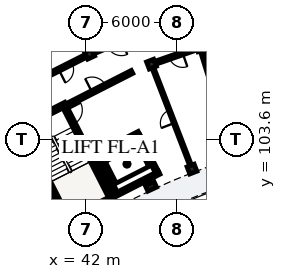
"""IFC4 building model, lengths in metres.
Left out: names, types, materials, properties, quantities, classifications, styles, units other than length and angle.
Written with IfcOpenShell. Run it as: python <this file> out.ifc"""

import sys

from ifc_helpers import new_model, si_unit, direction, frame, frame_2d, origin, origin_2d, place, context, subcontext, project, spatial, rectangle, extrude, element, fill, save


model = new_model("IFC4")
c1 = context("Model", 3, precision=1e-05, world=origin(), true_north=direction((0.0, 1.0)))
c2 = subcontext(c1, "Body", "Model", "MODEL_VIEW")
j1 = project(units=[si_unit("LENGTHUNIT", "METRE"), si_unit("PLANEANGLEUNIT", "RADIAN")], contexts=[c1])
p1 = place(None, origin())
s1 = spatial("IfcSite", under=j1, at=p1, CompositionType="ELEMENT")
p2 = place(p1, origin())
s2 = spatial("IfcBuilding", under=s1, at=p2, CompositionType="ELEMENT")
p3 = place(p2, frame((0.0, 0.0, 29.0)))
s3 = spatial("IfcBuildingStorey", under=s2, at=p3, CompositionType="ELEMENT", Elevation=29.0)
p4 = place(p3, frame((37.773, 104.296, 0.0), z_axis=(0.0, 0.0, 1.0), x_axis=(0.453992276384, -0.891005618941, 0.0)))
e1 = element("IfcWall", 1, at=p4, inside=s3, PredefinedType="SHEAR", context=c2, shape_type="SweptSolid", body=[
    extrude(rectangle(XDim=6.6, YDim=0.28, at=frame_2d((3.3, 0.0))), origin(), (0.0, 0.0, 1.0), 3.11),
])
for number, where, z_axis, x_axis in (
    (2, (40.709, 98.227, 0.0), (0.0, 0.0, 1.0), (0.891, 0.454, 0.0)),
    (3, (37.585, 104.357, 0.0), (0.0, 0.0, 1.0), (0.891, 0.454, 0.0)),
):
    element("IfcWall", number, at=place(p3, frame(where, z_axis=z_axis, x_axis=x_axis)), inside=s3, PredefinedType="SHEAR", context=c2, shape_type="SweptSolid", body=[
        extrude(rectangle(XDim=3.48, YDim=0.28, at=frame_2d((1.74, 0.0))), origin(), (0.0, 0.0, 1.0), 3.11),
    ])
p5 = place(p3, frame((40.625, 105.748, 0.0), z_axis=(0.0, 0.0, 1.0), x_axis=(0.453992276384, -0.891005618941, 0.0)))
e4 = element("IfcWall", 4, at=p5, inside=s3, PredefinedType="SHEAR", context=c2, shape_type="SweptSolid", body=[
    extrude(rectangle(XDim=6.6, YDim=0.28, at=frame_2d((3.3, 0.0))), origin(), (0.0, 0.0, 1.0), 3.11),
])
p6 = place(p5, frame((0.22, 0.0, 0.0)))
e5 = element("IfcOpeningElement", 5, at=p6, cuts=e4, PredefinedType="OPENING", context=c2, shape_type="SweptSolid", body=[
    extrude(rectangle(XDim=1.05, YDim=2.15, at=frame_2d((0.525, 1.075))), frame((0.0, 0.15, 0.0), z_axis=(0.0, -1.0, 0.0), x_axis=(1.0, 0.0, 0.0)), (0.0, 0.0, 1.0), 0.3),
])
p7 = place(p3, frame((42.597, 102.561, 0.0), z_axis=(0.0, 0.0, 1.0), x_axis=(0.891001200497, 0.454000947921, 0.0)))
e6 = element("IfcWall", 6, at=p7, inside=s3, PredefinedType="SHEAR", context=c2, shape_type="SweptSolid", body=[
    extrude(rectangle(XDim=3.26, YDim=0.23, at=frame_2d((1.63, 0.0))), origin(), (0.0, 0.0, 1.0), 3.11),
])
p8 = place(p7, frame((0.9, 0.0, 0.0)))
e7 = element("IfcOpeningElement", 7, at=p8, cuts=e6, PredefinedType="OPENING", context=c2, shape_type="SweptSolid", body=[
    extrude(rectangle(XDim=1.1, YDim=2.15, at=frame_2d((0.55, 1.075))), frame((0.0, 0.125, 0.0), z_axis=(0.0, -1.0, 0.0), x_axis=(1.0, 0.0, 0.0)), (0.0, 0.0, 1.0), 0.25),
])
p9 = place(p3, frame((43.927, 99.95, 0.0), z_axis=(0.0, 0.0, 1.0), x_axis=(0.891016635648, 0.453970654337, 0.0)))
e8 = element("IfcWall", 8, at=p9, inside=s3, PredefinedType="SHEAR", context=c2, shape_type="SweptSolid", body=[
    extrude(rectangle(XDim=3.26, YDim=0.23, at=frame_2d((1.63, 0.0))), origin(), (0.0, 0.0, 1.0), 3.11),
])
for number, where, z_axis, x_axis in (
    (9, (42.751, 102.511, 0.0), (0.0, 0.0, 1.0), (0.454, -0.891, 0.0)),
    (10, (45.451, 103.886, 0.0), (0.0, 0.0, 1.0), (0.454, -0.891, 0.0)),
):
    element("IfcWall", number, at=place(p3, frame(where, z_axis=z_axis, x_axis=x_axis)), inside=s3, PredefinedType="SHEAR", context=c2, shape_type="SweptSolid", body=[
        extrude(rectangle(XDim=2.7, YDim=0.23, at=frame_2d((1.35, 0.0))), origin(), (0.0, 0.0, 1.0), 3.11),
    ])
for number, where, z_axis, x_axis in (
    (11, (49.552, 109.695, 0.0), (0.0, 0.0, 1.0), (-0.298, 0.955, 0.0)),
    (12, (48.99, 101.667, 0.0), (0.0, 0.0, 1.0), (-0.36, 0.933, 0.0)),
    (13, (46.325, 108.57, 0.0), (0.0, 0.0, 1.0), (-0.36, 0.933, 0.0)),
):
    element("IfcColumn", number, at=place(p3, frame(where, z_axis=z_axis, x_axis=x_axis)), inside=s3, PredefinedType="COLUMN", context=c2, shape_type="SweptSolid", body=[
        extrude(rectangle(XDim=0.5, YDim=0.5, at=origin_2d()), origin(), (0.0, 0.0, 1.0), 3.115),
    ])
p10 = place(p3, frame((46.293, 100.522, 0.0), z_axis=(0.0, 0.0, 1.0), x_axis=(-0.420859924104, 0.907125638643, 0.0)))
e14 = element("IfcColumn", 14, at=p10, inside=s3, PredefinedType="PILASTER", context=c2, shape_type="SweptSolid", body=[
    extrude(rectangle(XDim=0.39, YDim=0.63, at=origin_2d()), origin(), (0.0, 0.0, 1.0), 3.115),
])
p11 = place(p3, frame((42.252, 109.23, 0.0), z_axis=(0.0, 0.0, 1.0), x_axis=(-0.420859924104, 0.907125638643, 0.0)))
e15 = element("IfcColumn", 15, at=p11, inside=s3, PredefinedType="COLUMN", context=c2, shape_type="SweptSolid", body=[
    extrude(rectangle(XDim=0.5, YDim=0.5, at=origin_2d()), origin(), (0.0, 0.0, 1.0), 3.115),
])
p12 = place(p3, frame((40.682, 105.834, 0.0), z_axis=(0.0, 0.0, 1.0), x_axis=(0.891003372311, 0.453996685595, 0.0)))
e16 = element("IfcWall", 16, at=p12, inside=s3, PredefinedType="PARTITIONING", context=c2, shape_type="SweptSolid", body=[
    extrude(rectangle(XDim=4.9, YDim=0.22, at=frame_2d((2.45, 0.0))), origin(), (0.0, 0.0, 1.0), 2.34),
])
p13 = place(p12, frame((1.95, 0.0, 0.0)))
e17 = element("IfcOpeningElement", 17, at=p13, cuts=e16, PredefinedType="OPENING", context=c2, shape_type="SweptSolid", body=[
    extrude(rectangle(XDim=1.0, YDim=2.15, at=frame_2d((0.5, 1.075))), frame((0.0, 0.12, 0.0), z_axis=(0.0, -1.0, 0.0), x_axis=(1.0, 0.0, 0.0)), (0.0, 0.0, 1.0), 0.24),
])
p14 = place(p3, frame((51.638, 103.013, 0.0), z_axis=(0.0, 0.0, 1.0), x_axis=(-0.2979590431, 0.954578655028, 0.0)))
e18 = element("IfcWall", 18, at=p14, inside=s3, PredefinedType="PARTITIONING", context=c2, shape_type="SweptSolid", body=[
    extrude(rectangle(XDim=6.6, YDim=0.185, at=frame_2d((3.3, 0.0))), origin(), (0.0, 0.0, 1.0), 2.37),
])
p15 = place(p3, frame((49.222, 109.58, 0.0), z_axis=(0.0, 0.0, 1.0), x_axis=(-0.944265123647, -0.329185929627, 0.0)))
e19 = element("IfcWall", 19, at=p15, inside=s3, PredefinedType="PARTITIONING", context=c2, shape_type="SweptSolid", body=[
    extrude(rectangle(XDim=2.718, YDim=0.205, at=frame_2d((1.359, 0.0))), origin(), (0.0, 0.0, 1.0), 2.37),
])
p16 = place(p15, frame((0.894, 0.0, 0.0)))
e20 = element("IfcOpeningElement", 20, at=p16, cuts=e19, PredefinedType="OPENING", context=c2, shape_type="SweptSolid", body=[
    extrude(rectangle(XDim=0.93, YDim=2.12, at=frame_2d((0.465, 1.06))), frame((0.0, 0.113, 0.0), z_axis=(0.0, -1.0, 0.0), x_axis=(1.0, 0.0, 0.0)), (0.0, 0.0, 1.0), 0.225),
])
p17 = place(p3, frame((48.846, 102.04, 0.0), z_axis=(0.0, 0.0, 1.0), x_axis=(-0.360183473608, 0.932881485152, 0.0)))
e21 = element("IfcWall", 21, at=p17, inside=s3, PredefinedType="PARTITIONING", context=c2, shape_type="SweptSolid", body=[
    extrude(rectangle(XDim=6.6, YDim=0.125, at=frame_2d((3.3, 0.0))), origin(), (0.0, 0.0, 1.0), 2.37),
])
p18 = place(p17, frame((2.845, 0.0, 0.0)))
e22 = element("IfcOpeningElement", 22, at=p18, cuts=e21, PredefinedType="OPENING", context=c2, shape_type="SweptSolid", body=[
    extrude(rectangle(XDim=0.91, YDim=2.1, at=frame_2d((0.455, 1.05))), frame((0.0, 0.073, 0.0), z_axis=(0.0, -1.0, 0.0), x_axis=(1.0, 0.0, 0.0)), (0.0, 0.0, 1.0), 0.145),
])
p19 = place(p3, frame((45.21, 110.486, 0.0), z_axis=(0.0, 0.0, 1.0), x_axis=(-0.920511160294, -0.390716270168, 0.0)))
e23 = element("IfcWall", 23, at=p19, inside=s3, PredefinedType="PARTITIONING", context=c2, shape_type="SweptSolid", body=[
    extrude(rectangle(XDim=2.863, YDim=0.205, at=frame_2d((1.432, 0.0))), origin(), (0.0, 0.0, 1.0), 2.37),
])
p20 = place(p19, frame((0.937, 0.0, 0.0)))
e24 = element("IfcOpeningElement", 24, at=p20, cuts=e23, PredefinedType="OPENING", context=c2, shape_type="SweptSolid", body=[
    extrude(rectangle(XDim=0.99, YDim=2.16, at=frame_2d((0.495, 1.08))), frame((0.0, 0.113, 0.0), z_axis=(0.0, -1.0, 0.0), x_axis=(1.0, 0.0, 0.0)), (0.0, 0.0, 1.0), 0.225),
])
p21 = place(p3, frame((41.94, 109.073, 0.0), z_axis=(0.0, 0.0, 1.0), x_axis=(-0.89273239336, -0.450587254419, 0.0)))
e25 = element("IfcWall", 25, at=p21, inside=s3, PredefinedType="PARTITIONING", context=c2, shape_type="SweptSolid", body=[
    extrude(rectangle(XDim=2.863, YDim=0.205, at=frame_2d((1.432, 0.0))), origin(), (0.0, 0.0, 1.0), 2.37),
])
p22 = place(p21, frame((0.947, 0.0, 0.0)))
e26 = element("IfcOpeningElement", 26, at=p22, cuts=e25, PredefinedType="OPENING", context=c2, shape_type="SweptSolid", body=[
    extrude(rectangle(XDim=0.97, YDim=2.15, at=frame_2d((0.485, 1.075))), frame((0.0, 0.113, 0.0), z_axis=(0.0, -1.0, 0.0), x_axis=(1.0, 0.0, 0.0)), (0.0, 0.0, 1.0), 0.225),
])
p23 = place(p6, origin())
e27 = element("IfcDoor", 27, at=p23, inside=s3, OperationType="SINGLE_SWING_LEFT", PredefinedType="DOOR", context=c2, shape_type="SweptSolid", body=[
    extrude(rectangle(XDim=1.05, YDim=2.15, at=frame_2d((0.525, 1.075))), frame((0.0, 0.025, 0.0), z_axis=(0.0, -1.0, 0.0), x_axis=(1.0, 0.0, 0.0)), (0.0, 0.0, 1.0), 0.05),
])
fill(e5, e27)
p24 = place(p8, origin())
e28 = element("IfcDoor", 28, at=p24, inside=s3, OperationType="DOUBLE_DOOR_SLIDING", PredefinedType="DOOR", context=c2, shape_type="SweptSolid", body=[
    extrude(rectangle(XDim=1.1, YDim=2.15, at=frame_2d((0.55, 1.075))), frame((0.0, 0.025, 0.0), z_axis=(0.0, -1.0, 0.0), x_axis=(1.0, 0.0, 0.0)), (0.0, 0.0, 1.0), 0.05),
])
fill(e7, e28)
p25 = place(p13, origin())
e29 = element("IfcDoor", 29, at=p25, inside=s3, OperationType="SINGLE_SWING_LEFT", PredefinedType="DOOR", context=c2, shape_type="SweptSolid", body=[
    extrude(rectangle(XDim=1.0, YDim=2.15, at=frame_2d((0.5, 1.075))), frame((0.0, 0.025, 0.0), z_axis=(0.0, -1.0, 0.0), x_axis=(1.0, 0.0, 0.0)), (0.0, 0.0, 1.0), 0.05),
])
fill(e17, e29)
p26 = place(p16, origin())
e30 = element("IfcDoor", 30, at=p26, inside=s3, OperationType="SINGLE_SWING_LEFT", PredefinedType="DOOR", context=c2, shape_type="SweptSolid", body=[
    extrude(rectangle(XDim=0.93, YDim=2.12, at=frame_2d((0.465, 1.06))), frame((0.0, 0.025, 0.0), z_axis=(0.0, -1.0, 0.0), x_axis=(1.0, 0.0, 0.0)), (0.0, 0.0, 1.0), 0.05),
])
fill(e20, e30)
p27 = place(p18, origin())
e31 = element("IfcDoor", 31, at=p27, inside=s3, OperationType="SINGLE_SWING_LEFT", PredefinedType="DOOR", context=c2, shape_type="SweptSolid", body=[
    extrude(rectangle(XDim=0.91, YDim=2.1, at=frame_2d((0.455, 1.05))), frame((0.0, 0.025, 0.0), z_axis=(0.0, -1.0, 0.0), x_axis=(1.0, 0.0, 0.0)), (0.0, 0.0, 1.0), 0.05),
])
fill(e22, e31)
p28 = place(p22, origin())
e32 = element("IfcDoor", 32, at=p28, inside=s3, OperationType="SINGLE_SWING_RIGHT", PredefinedType="DOOR", context=c2, shape_type="SweptSolid", body=[
    extrude(rectangle(XDim=0.97, YDim=2.15, at=frame_2d((0.485, 1.075))), frame((0.0, 0.025, 0.0), z_axis=(0.0, -1.0, 0.0), x_axis=(1.0, 0.0, 0.0)), (0.0, 0.0, 1.0), 0.05),
])
fill(e26, e32)
save(model, sys.argv[1])
